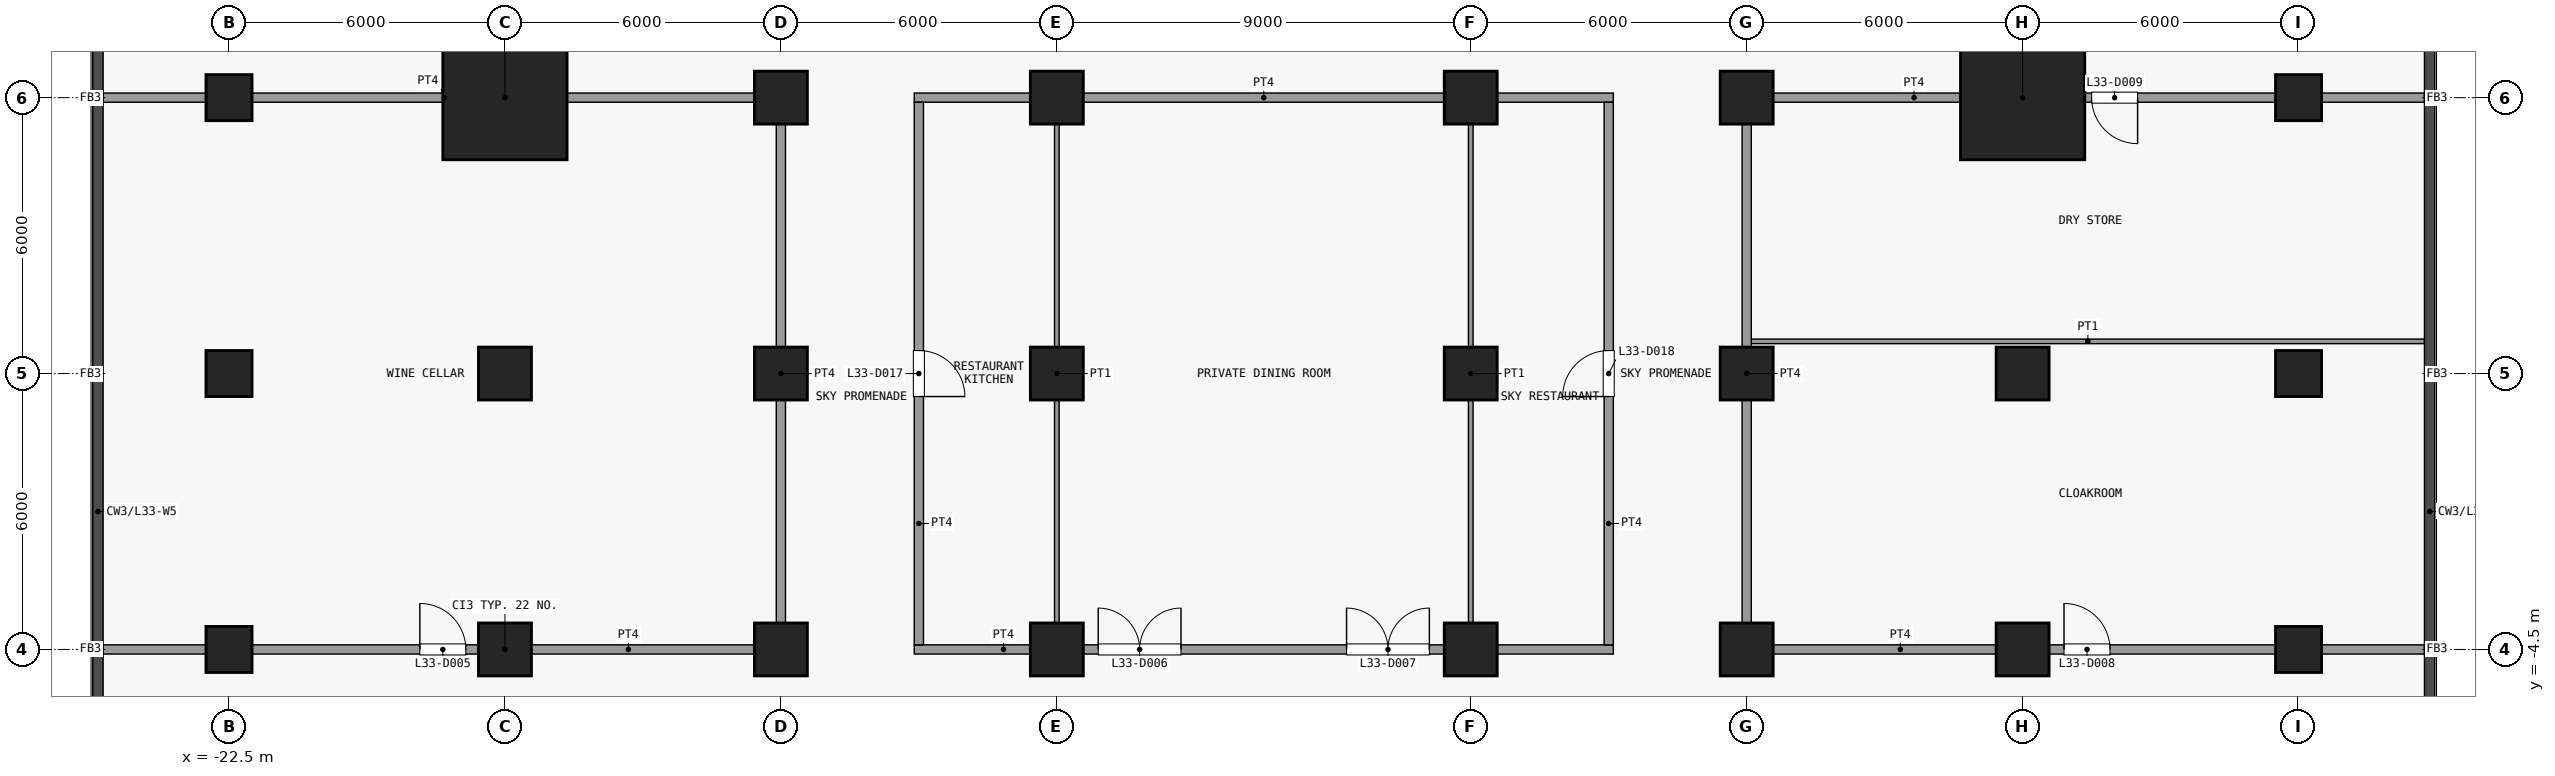
"""IFC4 building model, lengths in metres.
Left out: names, types, materials, properties, quantities, classifications, styles, units other than length and angle.
Written with IfcOpenShell. Run it as: python <this file> out.ifc"""

import sys

from ifc_helpers import new_model, si_unit, direction, frame, frame_2d, origin, origin_2d, place, context, subcontext, project, spatial, rectangle, extrude, element, fill, save


model = new_model("IFC4")
c1 = context("Model", 3, precision=1e-05, world=origin(), true_north=direction((0.0, 1.0)))
c2 = subcontext(c1, "Body", "Model", "MODEL_VIEW")
j1 = project(units=[si_unit("LENGTHUNIT", "METRE"), si_unit("PLANEANGLEUNIT", "RADIAN")], contexts=[c1])
p1 = place(None, origin())
s1 = spatial("IfcSite", under=j1, at=p1, CompositionType="ELEMENT")
p2 = place(p1, origin())
s2 = spatial("IfcBuilding", under=s1, at=p2, CompositionType="ELEMENT")
p3 = place(p2, frame((0.0, 0.0, 133.9)))
s3 = spatial("IfcBuildingStorey", under=s2, at=p3, CompositionType="ELEMENT", Elevation=133.9)
for number, where, z_axis, x_axis in (
    (1, (-22.5, -4.5, 0.0), (0.0, 0.0, 1.0), (1.0, 0.0, 0.0)),
    (2, (-22.5, 1.5, 0.0), (0.0, 0.0, 1.0), (1.0, 0.0, 0.0)),
    (3, (-22.5, 7.5, 0.0), (0.0, 0.0, 1.0), (1.0, 0.0, 0.0)),
):
    element("IfcColumn", number, at=place(p3, frame(where, z_axis=z_axis, x_axis=x_axis)), inside=s3, PredefinedType="COLUMN", context=c2, shape_type="SweptSolid", body=[
        extrude(rectangle(XDim=1.0, YDim=1.0, at=origin_2d()), origin(), (0.0, 0.0, 1.0), 5.0),
    ])
for number, where, z_axis, x_axis in (
    (4, (-16.5, -4.5, 0.0), (0.0, 0.0, 1.0), (1.0, 0.0, 0.0)),
    (5, (-16.5, 1.5, 0.0), (0.0, 0.0, 1.0), (1.0, 0.0, 0.0)),
):
    element("IfcColumn", number, at=place(p3, frame(where, z_axis=z_axis, x_axis=x_axis)), inside=s3, PredefinedType="COLUMN", context=c2, shape_type="SweptSolid", body=[
        extrude(rectangle(XDim=1.15, YDim=1.15, at=origin_2d()), origin(), (0.0, 0.0, 1.0), 5.0),
    ])
p4 = place(p3, frame((-16.5, 7.5, 0.0), z_axis=(0.0, 0.0, 1.0), x_axis=(1.0, 0.0, 0.0)))
e6 = element("IfcColumn", 6, at=p4, inside=s3, PredefinedType="COLUMN", context=c2, shape_type="SweptSolid", body=[
    extrude(rectangle(XDim=2.7, YDim=2.7, at=origin_2d()), origin(), (0.0, 0.0, 1.0), 5.0),
])
for number, where, z_axis, x_axis in (
    (7, (-10.5, -4.5, 0.0), (0.0, 0.0, 1.0), (1.0, 0.0, 0.0)),
    (8, (-10.5, 1.5, 0.0), (0.0, 0.0, 1.0), (1.0, 0.0, 0.0)),
    (9, (-10.5, 7.5, 0.0), (0.0, 0.0, 1.0), (1.0, 0.0, 0.0)),
    (10, (-4.5, -4.5, 0.0), (0.0, 0.0, 1.0), (1.0, 0.0, 0.0)),
    (11, (-4.5, 1.5, 0.0), (0.0, 0.0, 1.0), (1.0, 0.0, 0.0)),
    (12, (-4.5, 7.5, 0.0), (0.0, 0.0, 1.0), (1.0, 0.0, 0.0)),
    (13, (4.5, -4.5, 0.0), (0.0, 0.0, 1.0), (1.0, 0.0, 0.0)),
    (14, (4.5, 1.5, 0.0), (0.0, 0.0, 1.0), (1.0, 0.0, 0.0)),
    (15, (4.5, 7.5, 0.0), (0.0, 0.0, 1.0), (1.0, 0.0, 0.0)),
    (16, (10.5, -4.5, 0.0), (0.0, 0.0, 1.0), (1.0, 0.0, 0.0)),
    (17, (10.5, 1.5, 0.0), (0.0, 0.0, 1.0), (1.0, 0.0, 0.0)),
    (18, (10.5, 7.5, 0.0), (0.0, 0.0, 1.0), (1.0, 0.0, 0.0)),
    (19, (16.5, -4.5, 0.0), (0.0, 0.0, 1.0), (1.0, 0.0, 0.0)),
    (20, (16.5, 1.5, 0.0), (0.0, 0.0, 1.0), (1.0, 0.0, 0.0)),
):
    element("IfcColumn", number, at=place(p3, frame(where, z_axis=z_axis, x_axis=x_axis)), inside=s3, PredefinedType="COLUMN", context=c2, shape_type="SweptSolid", body=[
        extrude(rectangle(XDim=1.15, YDim=1.15, at=origin_2d()), origin(), (0.0, 0.0, 1.0), 5.0),
    ])
p5 = place(p3, frame((16.5, 7.5, 0.0), z_axis=(0.0, 0.0, 1.0), x_axis=(1.0, 0.0, 0.0)))
e21 = element("IfcColumn", 21, at=p5, inside=s3, PredefinedType="COLUMN", context=c2, shape_type="SweptSolid", body=[
    extrude(rectangle(XDim=2.7, YDim=2.7, at=origin_2d()), origin(), (0.0, 0.0, 1.0), 5.0),
])
for number, where, z_axis, x_axis in (
    (22, (22.5, -4.5, 0.0), (0.0, 0.0, 1.0), (1.0, 0.0, 0.0)),
    (23, (22.5, 1.5, 0.0), (0.0, 0.0, 1.0), (1.0, 0.0, 0.0)),
    (24, (22.5, 7.5, 0.0), (0.0, 0.0, 1.0), (1.0, 0.0, 0.0)),
):
    element("IfcColumn", number, at=place(p3, frame(where, z_axis=z_axis, x_axis=x_axis)), inside=s3, PredefinedType="COLUMN", context=c2, shape_type="SweptSolid", body=[
        extrude(rectangle(XDim=1.0, YDim=1.0, at=origin_2d()), origin(), (0.0, 0.0, 1.0), 5.0),
    ])
p6 = place(p3, frame((-25.238, -4.5, 0.0), z_axis=(0.0, 0.0, 1.0), x_axis=(1.0, 0.0, 0.0)))
e25 = element("IfcWall", 25, at=p6, inside=s3, PredefinedType="PARTITIONING", context=c2, shape_type="SweptSolid", body=[
    extrude(rectangle(XDim=14.838, YDim=0.2, at=frame_2d((7.419, 0.0))), origin(), (0.0, 0.0, 1.0), 4.7),
])
p7 = place(p6, frame((6.887, 0.0, 0.0)))
e26 = element("IfcOpeningElement", 26, at=p7, cuts=e25, PredefinedType="OPENING", context=c2, shape_type="SweptSolid", body=[
    extrude(rectangle(XDim=1.0, YDim=2.1, at=frame_2d((0.5, 1.05))), frame((0.0, 0.11, 0.0), z_axis=(0.0, -1.0, 0.0), x_axis=(1.0, 0.0, 0.0)), (0.0, 0.0, 1.0), 0.22),
])
p8 = place(p3, frame((-7.6, -4.5, 0.0), z_axis=(0.0, 0.0, 1.0), x_axis=(1.0, 0.0, 0.0)))
e27 = element("IfcWall", 27, at=p8, inside=s3, PredefinedType="PARTITIONING", context=c2, shape_type="SweptSolid", body=[
    extrude(rectangle(XDim=15.2, YDim=0.2, at=frame_2d((7.6, 0.0))), origin(), (0.0, 0.0, 1.0), 4.7),
])
p9 = place(p8, frame((4.0, 0.0, 0.0)))
e28 = element("IfcOpeningElement", 28, at=p9, cuts=e27, PredefinedType="OPENING", context=c2, shape_type="SweptSolid", body=[
    extrude(rectangle(XDim=1.8, YDim=2.1, at=frame_2d((0.9, 1.05))), frame((0.0, 0.11, 0.0), z_axis=(0.0, -1.0, 0.0), x_axis=(1.0, 0.0, 0.0)), (0.0, 0.0, 1.0), 0.22),
])
p10 = place(p8, frame((9.4, 0.0, 0.0)))
e29 = element("IfcOpeningElement", 29, at=p10, cuts=e27, PredefinedType="OPENING", context=c2, shape_type="SweptSolid", body=[
    extrude(rectangle(XDim=1.8, YDim=2.1, at=frame_2d((0.9, 1.05))), frame((0.0, 0.11, 0.0), z_axis=(0.0, -1.0, 0.0), x_axis=(1.0, 0.0, 0.0)), (0.0, 0.0, 1.0), 0.22),
])
p11 = place(p3, frame((10.4, -4.5, 0.0), z_axis=(0.0, 0.0, 1.0), x_axis=(1.0, 0.0, 0.0)))
e30 = element("IfcWall", 30, at=p11, inside=s3, PredefinedType="PARTITIONING", context=c2, shape_type="SweptSolid", body=[
    extrude(rectangle(XDim=14.838, YDim=0.2, at=frame_2d((7.419, 0.0))), origin(), (0.0, 0.0, 1.0), 4.7),
])
p12 = place(p11, frame((7.0, 0.0, 0.0)))
e31 = element("IfcOpeningElement", 31, at=p12, cuts=e30, PredefinedType="OPENING", context=c2, shape_type="SweptSolid", body=[
    extrude(rectangle(XDim=1.0, YDim=2.1, at=frame_2d((0.5, 1.05))), frame((0.0, 0.11, 0.0), z_axis=(0.0, -1.0, 0.0), x_axis=(1.0, 0.0, 0.0)), (0.0, 0.0, 1.0), 0.22),
])
p13 = place(p3, frame((10.6, 2.2, 0.0), z_axis=(0.0, 0.0, 1.0), x_axis=(1.0, 0.0, 0.0)))
e32 = element("IfcWall", 32, at=p13, inside=s3, PredefinedType="PARTITIONING", context=c2, shape_type="SweptSolid", body=[
    extrude(rectangle(XDim=14.637, YDim=0.1, at=frame_2d((7.319, 0.0))), origin(), (0.0, 0.0, 1.0), 4.7),
])
p14 = place(p3, frame((-25.238, 7.5, 0.0), z_axis=(0.0, 0.0, 1.0), x_axis=(1.0, 0.0, 0.0)))
e33 = element("IfcWall", 33, at=p14, inside=s3, PredefinedType="PARTITIONING", context=c2, shape_type="SweptSolid", body=[
    extrude(rectangle(XDim=14.838, YDim=0.2, at=frame_2d((7.419, 0.0))), origin(), (0.0, 0.0, 1.0), 4.7),
])
p15 = place(p3, frame((-7.6, 7.5, 0.0), z_axis=(0.0, 0.0, 1.0), x_axis=(1.0, 0.0, 0.0)))
e34 = element("IfcWall", 34, at=p15, inside=s3, PredefinedType="PARTITIONING", context=c2, shape_type="SweptSolid", body=[
    extrude(rectangle(XDim=15.2, YDim=0.2, at=frame_2d((7.6, 0.0))), origin(), (0.0, 0.0, 1.0), 4.7),
])
p16 = place(p3, frame((10.4, 7.5, 0.0), z_axis=(0.0, 0.0, 1.0), x_axis=(1.0, 0.0, 0.0)))
e35 = element("IfcWall", 35, at=p16, inside=s3, PredefinedType="PARTITIONING", context=c2, shape_type="SweptSolid", body=[
    extrude(rectangle(XDim=14.838, YDim=0.2, at=frame_2d((7.419, 0.0))), origin(), (0.0, 0.0, 1.0), 4.7),
])
p17 = place(p16, frame((7.6, 0.0, 0.0)))
e36 = element("IfcOpeningElement", 36, at=p17, cuts=e35, PredefinedType="OPENING", context=c2, shape_type="SweptSolid", body=[
    extrude(rectangle(XDim=1.0, YDim=2.1, at=frame_2d((0.5, 1.05))), frame((0.0, 0.11, 0.0), z_axis=(0.0, -1.0, 0.0), x_axis=(1.0, 0.0, 0.0)), (0.0, 0.0, 1.0), 0.22),
])
p18 = place(p3, frame((-10.5, -4.4, 0.0), z_axis=(0.0, 0.0, 1.0), x_axis=(0.0, 1.0, 0.0)))
e37 = element("IfcWall", 37, at=p18, inside=s3, PredefinedType="PARTITIONING", context=c2, shape_type="SweptSolid", body=[
    extrude(rectangle(XDim=11.8, YDim=0.2, at=frame_2d((5.9, 0.0))), origin(), (0.0, 0.0, 1.0), 4.7),
])
p19 = place(p3, frame((-7.5, -4.4, 0.0), z_axis=(0.0, 0.0, 1.0), x_axis=(0.0, 1.0, 0.0)))
e38 = element("IfcWall", 38, at=p19, inside=s3, PredefinedType="PARTITIONING", context=c2, shape_type="SweptSolid", body=[
    extrude(rectangle(XDim=11.8, YDim=0.2, at=frame_2d((5.9, 0.0))), origin(), (0.0, 0.0, 1.0), 4.7),
])
p20 = place(p19, frame((5.4, 0.0, 0.0)))
e39 = element("IfcOpeningElement", 39, at=p20, cuts=e38, PredefinedType="OPENING", context=c2, shape_type="SweptSolid", body=[
    extrude(rectangle(XDim=1.0, YDim=2.1, at=frame_2d((0.5, 1.05))), frame((0.0, 0.11, 0.0), z_axis=(0.0, -1.0, 0.0), x_axis=(1.0, 0.0, 0.0)), (0.0, 0.0, 1.0), 0.22),
])
for number, where, z_axis, x_axis in (
    (40, (-4.5, -4.4, 0.0), (0.0, 0.0, 1.0), (0.0, 1.0, 0.0)),
    (41, (4.5, -4.4, 0.0), (0.0, 0.0, 1.0), (0.0, 1.0, 0.0)),
):
    element("IfcWall", number, at=place(p3, frame(where, z_axis=z_axis, x_axis=x_axis)), inside=s3, PredefinedType="PARTITIONING", context=c2, shape_type="SweptSolid", body=[
        extrude(rectangle(XDim=11.8, YDim=0.1, at=frame_2d((5.9, 0.0))), origin(), (0.0, 0.0, 1.0), 4.7),
    ])
p21 = place(p3, frame((7.5, -4.4, 0.0), z_axis=(0.0, 0.0, 1.0), x_axis=(0.0, 1.0, 0.0)))
e42 = element("IfcWall", 42, at=p21, inside=s3, PredefinedType="PARTITIONING", context=c2, shape_type="SweptSolid", body=[
    extrude(rectangle(XDim=11.8, YDim=0.2, at=frame_2d((5.9, 0.0))), origin(), (0.0, 0.0, 1.0), 4.7),
])
p22 = place(p21, frame((5.4, 0.0, 0.0)))
e43 = element("IfcOpeningElement", 43, at=p22, cuts=e42, PredefinedType="OPENING", context=c2, shape_type="SweptSolid", body=[
    extrude(rectangle(XDim=1.0, YDim=2.1, at=frame_2d((0.5, 1.05))), frame((0.0, 0.11, 0.0), z_axis=(0.0, -1.0, 0.0), x_axis=(1.0, 0.0, 0.0)), (0.0, 0.0, 1.0), 0.22),
])
p23 = place(p3, frame((10.5, -4.4, 0.0), z_axis=(0.0, 0.0, 1.0), x_axis=(0.0, 1.0, 0.0)))
e44 = element("IfcWall", 44, at=p23, inside=s3, PredefinedType="PARTITIONING", context=c2, shape_type="SweptSolid", body=[
    extrude(rectangle(XDim=11.8, YDim=0.2, at=frame_2d((5.9, 0.0))), origin(), (0.0, 0.0, 1.0), 4.7),
])
p24 = place(p7, origin())
e45 = element("IfcDoor", 45, at=p24, inside=s3, OperationType="SINGLE_SWING_RIGHT", PredefinedType="DOOR", context=c2, shape_type="SweptSolid", body=[
    extrude(rectangle(XDim=1.0, YDim=2.1, at=frame_2d((0.5, 1.05))), frame((0.0, 0.025, 0.0), z_axis=(0.0, -1.0, 0.0), x_axis=(1.0, 0.0, 0.0)), (0.0, 0.0, 1.0), 0.05),
])
fill(e26, e45)
p25 = place(p9, origin())
e46 = element("IfcDoor", 46, at=p25, inside=s3, OperationType="DOUBLE_DOOR_SINGLE_SWING", PredefinedType="DOOR", context=c2, shape_type="SweptSolid", body=[
    extrude(rectangle(XDim=1.8, YDim=2.1, at=frame_2d((0.9, 1.05))), frame((0.0, 0.025, 0.0), z_axis=(0.0, -1.0, 0.0), x_axis=(1.0, 0.0, 0.0)), (0.0, 0.0, 1.0), 0.05),
])
fill(e28, e46)
p26 = place(p10, origin())
e47 = element("IfcDoor", 47, at=p26, inside=s3, OperationType="DOUBLE_DOOR_SINGLE_SWING", PredefinedType="DOOR", context=c2, shape_type="SweptSolid", body=[
    extrude(rectangle(XDim=1.8, YDim=2.1, at=frame_2d((0.9, 1.05))), frame((0.0, 0.025, 0.0), z_axis=(0.0, -1.0, 0.0), x_axis=(1.0, 0.0, 0.0)), (0.0, 0.0, 1.0), 0.05),
])
fill(e29, e47)
p27 = place(p12, origin())
e48 = element("IfcDoor", 48, at=p27, inside=s3, OperationType="SINGLE_SWING_RIGHT", PredefinedType="DOOR", context=c2, shape_type="SweptSolid", body=[
    extrude(rectangle(XDim=1.0, YDim=2.1, at=frame_2d((0.5, 1.05))), frame((0.0, 0.025, 0.0), z_axis=(0.0, -1.0, 0.0), x_axis=(1.0, 0.0, 0.0)), (0.0, 0.0, 1.0), 0.05),
])
fill(e31, e48)
p28 = place(p17, origin())
e49 = element("IfcDoor", 49, at=p28, inside=s3, OperationType="SINGLE_SWING_RIGHT", PredefinedType="DOOR", context=c2, shape_type="SweptSolid", body=[
    extrude(rectangle(XDim=1.0, YDim=2.1, at=frame_2d((0.5, 1.05))), frame((0.0, 0.025, 0.0), z_axis=(0.0, -1.0, 0.0), x_axis=(1.0, 0.0, 0.0)), (0.0, 0.0, 1.0), 0.05),
])
fill(e36, e49)
p29 = place(p20, origin())
e50 = element("IfcDoor", 50, at=p29, inside=s3, OperationType="SINGLE_SWING_LEFT", PredefinedType="DOOR", context=c2, shape_type="SweptSolid", body=[
    extrude(rectangle(XDim=1.0, YDim=2.1, at=frame_2d((0.5, 1.05))), frame((0.0, 0.025, 0.0), z_axis=(0.0, -1.0, 0.0), x_axis=(1.0, 0.0, 0.0)), (0.0, 0.0, 1.0), 0.05),
])
fill(e39, e50)
p30 = place(p22, origin())
e51 = element("IfcDoor", 51, at=p30, inside=s3, OperationType="SINGLE_SWING_RIGHT", PredefinedType="DOOR", context=c2, shape_type="SweptSolid", body=[
    extrude(rectangle(XDim=1.0, YDim=2.1, at=frame_2d((0.5, 1.05))), frame((0.0, 0.025, 0.0), z_axis=(0.0, -1.0, 0.0), x_axis=(1.0, 0.0, 0.0)), (0.0, 0.0, 1.0), 0.05),
])
fill(e43, e51)
save(model, sys.argv[1])
